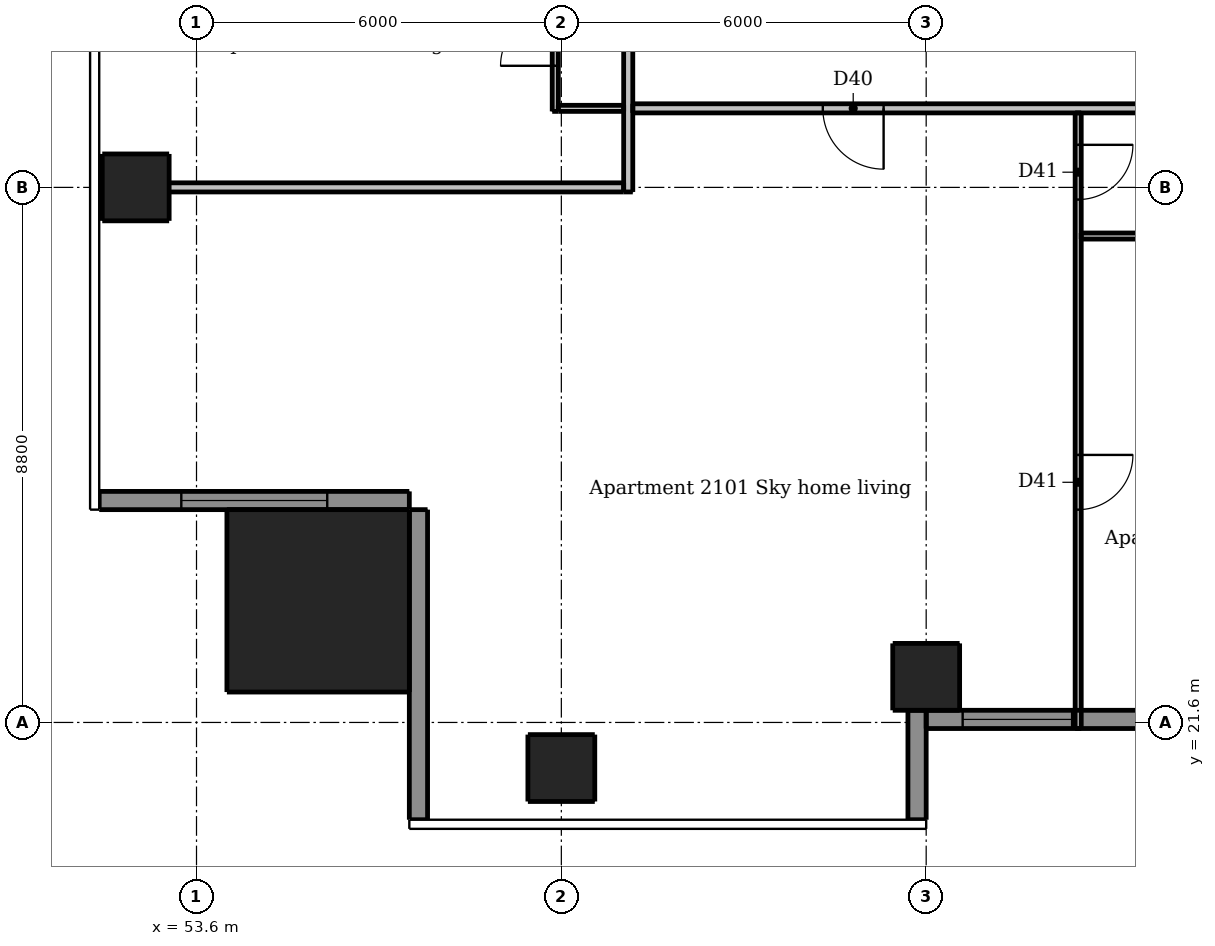
"""IFC4 building model, lengths in metres.
Left out: names, types, materials, properties, quantities, classifications, styles, units other than length and angle.
Written with IfcOpenShell. Run it as: python <this file> out.ifc"""

import sys

from ifc_helpers import new_model, si_unit, direction, frame, frame_2d, origin, origin_2d, place, context, subcontext, project, spatial, rectangle, extrude, element, fill, save


model = new_model("IFC4")
c1 = context("Model", 3, precision=1e-05, world=origin(), true_north=direction((0.0, 1.0)))
c2 = subcontext(c1, "Body", "Model", "MODEL_VIEW")
j1 = project(units=[si_unit("LENGTHUNIT", "METRE"), si_unit("PLANEANGLEUNIT", "RADIAN")], contexts=[c1])
p1 = place(None, origin())
s1 = spatial("IfcSite", under=j1, at=p1, CompositionType="ELEMENT")
p2 = place(p1, origin())
s2 = spatial("IfcBuilding", under=s1, at=p2, CompositionType="ELEMENT")
p3 = place(p2, frame((0.0, 0.0, 82.0)))
s3 = spatial("IfcBuildingStorey", under=s2, at=p3, CompositionType="ELEMENT", Elevation=82.0)
for number, where, z_axis, x_axis in (
    (1, (59.6, 20.85, 0.0), (0.0, 0.0, 1.0), (1.0, 0.0, 0.0)),
    (2, (65.6, 22.35, 0.0), (0.0, 0.0, 1.0), (1.0, 0.0, 0.0)),
    (3, (52.6, 30.4, 0.0), (0.0, 0.0, 1.0), (1.0, 0.0, 0.0)),
):
    element("IfcColumn", number, at=place(p3, frame(where, z_axis=z_axis, x_axis=x_axis)), inside=s3, PredefinedType="COLUMN", context=c2, shape_type="SweptSolid", body=[
        extrude(rectangle(XDim=1.1, YDim=1.1, at=origin_2d()), origin(), (0.0, 0.0, 1.0), 3.05),
    ])
p4 = place(p3, frame((55.6, 23.6, 0.0), z_axis=(0.0, 0.0, 1.0), x_axis=(1.0, 0.0, 0.0)))
e4 = element("IfcColumn", 4, at=p4, inside=s3, PredefinedType="COLUMN", context=c2, shape_type="SweptSolid", body=[
    extrude(rectangle(XDim=3.0, YDim=3.0, at=origin_2d()), origin(), (0.0, 0.0, 1.0), 3.3),
])
p5 = place(p3, frame((65.45, 20.0, 0.0), z_axis=(0.0, 0.0, 1.0), x_axis=(0.0, 1.0, 0.0)))
e5 = element("IfcWall", 5, at=p5, inside=s3, PredefinedType="SOLIDWALL", context=c2, shape_type="SweptSolid", body=[
    extrude(rectangle(XDim=1.8, YDim=0.3, at=frame_2d((0.9, 0.0))), origin(), (0.0, 0.0, 1.0), 3.05),
])
p6 = place(p3, frame((52.0, 25.25, 0.0), z_axis=(0.0, 0.0, 1.0), x_axis=(1.0, 0.0, 0.0)))
e6 = element("IfcWall", 6, at=p6, inside=s3, PredefinedType="SOLIDWALL", context=c2, shape_type="SweptSolid", body=[
    extrude(rectangle(XDim=5.1, YDim=0.3, at=frame_2d((2.55, 0.0))), origin(), (0.0, 0.0, 1.0), 3.05),
])
p7 = place(p6, frame((1.35, 0.0, 0.15)))
e7 = element("IfcOpeningElement", 7, at=p7, cuts=e6, PredefinedType="OPENING", context=c2, shape_type="SweptSolid", body=[
    extrude(rectangle(XDim=2.4, YDim=2.1, at=frame_2d((1.2, 1.05))), frame((0.0, 0.16, 0.0), z_axis=(0.0, -1.0, 0.0), x_axis=(1.0, 0.0, 0.0)), (0.0, 0.0, 1.0), 0.32),
])
p8 = place(p3, frame((57.25, 25.1, 0.0), z_axis=(0.0, 0.0, 1.0), x_axis=(0.0, -1.0, 0.0)))
e8 = element("IfcWall", 8, at=p8, inside=s3, PredefinedType="SOLIDWALL", context=c2, shape_type="SweptSolid", body=[
    extrude(rectangle(XDim=5.1, YDim=0.3, at=frame_2d((2.55, 0.0))), origin(), (0.0, 0.0, 1.0), 3.05),
])
p9 = place(p3, frame((65.6, 21.65, 0.0), z_axis=(0.0, 0.0, 1.0), x_axis=(1.0, 0.0, 0.0)))
e9 = element("IfcWall", 9, at=p9, inside=s3, PredefinedType="SOLIDWALL", context=c2, shape_type="SweptSolid", body=[
    extrude(rectangle(XDim=6.0, YDim=0.3, at=frame_2d((3.0, 0.0))), origin(), (0.0, 0.0, 1.0), 3.05),
])
p10 = place(p9, frame((0.6, 0.0, 0.15)))
e10 = element("IfcOpeningElement", 10, at=p10, cuts=e9, PredefinedType="OPENING", context=c2, shape_type="SweptSolid", body=[
    extrude(rectangle(XDim=1.8, YDim=2.1, at=frame_2d((0.9, 1.05))), frame((0.0, 0.16, 0.0), z_axis=(0.0, -1.0, 0.0), x_axis=(1.0, 0.0, 0.0)), (0.0, 0.0, 1.0), 0.32),
])
p11 = place(p9, frame((3.6, 0.0, 0.15)))
e11 = element("IfcOpeningElement", 11, at=p11, cuts=e9, PredefinedType="OPENING", context=c2, shape_type="SweptSolid", body=[
    extrude(rectangle(XDim=1.8, YDim=2.1, at=frame_2d((0.9, 1.05))), frame((0.0, 0.16, 0.0), z_axis=(0.0, -1.0, 0.0), x_axis=(1.0, 0.0, 0.0)), (0.0, 0.0, 1.0), 0.32),
])
p12 = place(p3, frame((59.5, 31.65, 0.0), z_axis=(0.0, 0.0, 1.0), x_axis=(0.0, 1.0, 0.0)))
e12 = element("IfcWall", 12, at=p12, inside=s3, PredefinedType="PARTITIONING", context=c2, shape_type="SweptSolid", body=[
    extrude(rectangle(XDim=16.675, YDim=0.1, at=frame_2d((8.337, 0.0))), origin(), (0.0, 0.0, 1.0), 2.51),
])
p13 = place(p12, frame((0.75, 0.0, 0.0)))
e13 = element("IfcOpeningElement", 13, at=p13, cuts=e12, PredefinedType="OPENING", context=c2, shape_type="SweptSolid", body=[
    extrude(rectangle(XDim=0.9, YDim=2.1, at=frame_2d((0.45, 1.05))), frame((0.0, 0.06, 0.0), z_axis=(0.0, -1.0, 0.0), x_axis=(1.0, 0.0, 0.0)), (0.0, 0.0, 1.0), 0.12),
])
p14 = place(p12, frame((3.1, 0.0, 0.0)))
e14 = element("IfcOpeningElement", 14, at=p14, cuts=e12, PredefinedType="OPENING", context=c2, shape_type="SweptSolid", body=[
    extrude(rectangle(XDim=0.9, YDim=2.1, at=frame_2d((0.45, 1.05))), frame((0.0, 0.06, 0.0), z_axis=(0.0, -1.0, 0.0), x_axis=(1.0, 0.0, 0.0)), (0.0, 0.0, 1.0), 0.12),
])
p15 = place(p12, frame((8.5, 0.0, 0.0)))
e15 = element("IfcOpeningElement", 15, at=p15, cuts=e12, PredefinedType="OPENING", context=c2, shape_type="SweptSolid", body=[
    extrude(rectangle(XDim=0.9, YDim=2.1, at=frame_2d((0.45, 1.05))), frame((0.0, 0.06, 0.0), z_axis=(0.0, -1.0, 0.0), x_axis=(1.0, 0.0, 0.0)), (0.0, 0.0, 1.0), 0.12),
])
p16 = place(p12, frame((14.5, 0.0, 0.0)))
e16 = element("IfcOpeningElement", 16, at=p16, cuts=e12, PredefinedType="OPENING", context=c2, shape_type="SweptSolid", body=[
    extrude(rectangle(XDim=0.9, YDim=2.1, at=frame_2d((0.45, 1.05))), frame((0.0, 0.06, 0.0), z_axis=(0.0, -1.0, 0.0), x_axis=(1.0, 0.0, 0.0)), (0.0, 0.0, 1.0), 0.12),
])
p17 = place(p12, frame((5.55, 0.0, 0.0)))
e17 = element("IfcOpeningElement", 17, at=p17, cuts=e12, PredefinedType="OPENING", context=c2, shape_type="SweptSolid", body=[
    extrude(rectangle(XDim=0.8, YDim=2.1, at=frame_2d((0.4, 1.05))), frame((0.0, 0.06, 0.0), z_axis=(0.0, -1.0, 0.0), x_axis=(1.0, 0.0, 0.0)), (0.0, 0.0, 1.0), 0.12),
])
p18 = place(p12, frame((11.55, 0.0, 0.0)))
e18 = element("IfcOpeningElement", 18, at=p18, cuts=e12, PredefinedType="OPENING", context=c2, shape_type="SweptSolid", body=[
    extrude(rectangle(XDim=0.8, YDim=2.1, at=frame_2d((0.4, 1.05))), frame((0.0, 0.06, 0.0), z_axis=(0.0, -1.0, 0.0), x_axis=(1.0, 0.0, 0.0)), (0.0, 0.0, 1.0), 0.12),
])
p19 = place(p3, frame((68.1, 31.625, 0.0), z_axis=(0.0, 0.0, 1.0), x_axis=(0.0, -1.0, 0.0)))
e19 = element("IfcWall", 19, at=p19, inside=s3, PredefinedType="PARTITIONING", context=c2, shape_type="SweptSolid", body=[
    extrude(rectangle(XDim=10.125, YDim=0.1, at=frame_2d((5.062, 0.0))), origin(), (0.0, 0.0, 1.0), 3.05),
])
p20 = place(p19, frame((0.525, 0.0, 0.0)))
e20 = element("IfcOpeningElement", 20, at=p20, cuts=e19, PredefinedType="OPENING", context=c2, shape_type="SweptSolid", body=[
    extrude(rectangle(XDim=0.9, YDim=2.1, at=frame_2d((0.45, 1.05))), frame((0.0, 0.06, 0.0), z_axis=(0.0, -1.0, 0.0), x_axis=(1.0, 0.0, 0.0)), (0.0, 0.0, 1.0), 0.12),
])
p21 = place(p19, frame((5.625, 0.0, 0.0)))
e21 = element("IfcOpeningElement", 21, at=p21, cuts=e19, PredefinedType="OPENING", context=c2, shape_type="SweptSolid", body=[
    extrude(rectangle(XDim=0.9, YDim=2.1, at=frame_2d((0.45, 1.05))), frame((0.0, 0.06, 0.0), z_axis=(0.0, -1.0, 0.0), x_axis=(1.0, 0.0, 0.0)), (0.0, 0.0, 1.0), 0.12),
])
p22 = place(p3, frame((59.55, 31.7, 0.0), z_axis=(0.0, 0.0, 1.0), x_axis=(1.0, 0.0, 0.0)))
e22 = element("IfcWall", 22, at=p22, inside=s3, PredefinedType="PARTITIONING", context=c2, shape_type="SweptSolid", body=[
    extrude(rectangle(XDim=1.075, YDim=0.1, at=frame_2d((0.538, 0.0))), origin(), (0.0, 0.0, 1.0), 3.05),
])
p23 = place(p3, frame((68.15, 29.6, 0.0), z_axis=(0.0, 0.0, 1.0), x_axis=(1.0, 0.0, 0.0)))
e23 = element("IfcWall", 23, at=p23, inside=s3, PredefinedType="PARTITIONING", context=c2, shape_type="SweptSolid", body=[
    extrude(rectangle(XDim=6.475, YDim=0.1, at=frame_2d((3.238, 0.0))), origin(), (0.0, 0.0, 1.0), 3.05),
])
p24 = place(p23, frame((4.05, 0.0, 0.0)))
e24 = element("IfcOpeningElement", 24, at=p24, cuts=e23, PredefinedType="OPENING", context=c2, shape_type="SweptSolid", body=[
    extrude(rectangle(XDim=0.8, YDim=2.1, at=frame_2d((0.4, 1.05))), frame((0.0, 0.06, 0.0), z_axis=(0.0, -1.0, 0.0), x_axis=(1.0, 0.0, 0.0)), (0.0, 0.0, 1.0), 0.12),
])
p25 = place(p3, frame((60.7, 30.325, 0.0), z_axis=(0.0, 0.0, 1.0), x_axis=(0.0, 1.0, 0.0)))
e25 = element("IfcWall", 25, at=p25, inside=s3, PredefinedType="PARTITIONING", context=c2, shape_type="SweptSolid", body=[
    extrude(rectangle(XDim=28.9, YDim=0.15, at=frame_2d((14.45, 0.0))), origin(), (0.0, 0.0, 1.0), 3.05),
])
p26 = place(p25, frame((9.225, 0.0, 0.0)))
e26 = element("IfcOpeningElement", 26, at=p26, cuts=e25, PredefinedType="OPENING", context=c2, shape_type="SweptSolid", body=[
    extrude(rectangle(XDim=1.0, YDim=2.1, at=frame_2d((0.5, 1.05))), frame((0.0, 0.085, 0.0), z_axis=(0.0, -1.0, 0.0), x_axis=(1.0, 0.0, 0.0)), (0.0, 0.0, 1.0), 0.17),
])
p27 = place(p25, frame((26.025, 0.0, 0.0)))
e27 = element("IfcOpeningElement", 27, at=p27, cuts=e25, PredefinedType="OPENING", context=c2, shape_type="SweptSolid", body=[
    extrude(rectangle(XDim=1.0, YDim=2.1, at=frame_2d((0.5, 1.05))), frame((0.0, 0.085, 0.0), z_axis=(0.0, -1.0, 0.0), x_axis=(1.0, 0.0, 0.0)), (0.0, 0.0, 1.0), 0.17),
])
p28 = place(p3, frame((89.525, 31.7, 0.0), z_axis=(0.0, 0.0, 1.0), x_axis=(-1.0, 0.0, 0.0)))
e28 = element("IfcWall", 28, at=p28, inside=s3, PredefinedType="PARTITIONING", context=c2, shape_type="SweptSolid", body=[
    extrude(rectangle(XDim=28.75, YDim=0.15, at=frame_2d((14.375, 0.0))), origin(), (0.0, 0.0, 1.0), 3.05),
])
p29 = place(p28, frame((24.625, 0.0, 0.0)))
e29 = element("IfcOpeningElement", 29, at=p29, cuts=e28, PredefinedType="OPENING", context=c2, shape_type="SweptSolid", body=[
    extrude(rectangle(XDim=1.0, YDim=2.1, at=frame_2d((0.5, 1.05))), frame((0.0, 0.085, 0.0), z_axis=(0.0, -1.0, 0.0), x_axis=(1.0, 0.0, 0.0)), (0.0, 0.0, 1.0), 0.17),
])
p30 = place(p28, frame((7.525, 0.0, 0.0)))
e30 = element("IfcOpeningElement", 30, at=p30, cuts=e28, PredefinedType="OPENING", context=c2, shape_type="SweptSolid", body=[
    extrude(rectangle(XDim=1.0, YDim=2.1, at=frame_2d((0.5, 1.05))), frame((0.0, 0.085, 0.0), z_axis=(0.0, -1.0, 0.0), x_axis=(1.0, 0.0, 0.0)), (0.0, 0.0, 1.0), 0.17),
])
p31 = place(p3, frame((52.0, 30.4, 0.0), z_axis=(0.0, 0.0, 1.0), x_axis=(1.0, 0.0, 0.0)))
e31 = element("IfcWall", 31, at=p31, inside=s3, PredefinedType="PARTITIONING", context=c2, shape_type="SweptSolid", body=[
    extrude(rectangle(XDim=8.625, YDim=0.15, at=frame_2d((4.312, 0.0))), origin(), (0.0, 0.0, 1.0), 2.647),
])
p32 = place(p7, origin())
e32 = element("IfcWindow", 32, at=p32, inside=s3, PartitioningType="DOUBLE_PANEL_VERTICAL", PredefinedType="WINDOW", context=c2, shape_type="SweptSolid", body=[
    extrude(rectangle(XDim=2.4, YDim=2.1, at=frame_2d((1.2, 1.05))), frame((0.0, 0.03, 0.0), z_axis=(0.0, -1.0, 0.0), x_axis=(1.0, 0.0, 0.0)), (0.0, 0.0, 1.0), 0.06),
])
fill(e7, e32)
p33 = place(p10, origin())
e33 = element("IfcWindow", 33, at=p33, inside=s3, PartitioningType="DOUBLE_PANEL_VERTICAL", PredefinedType="WINDOW", context=c2, shape_type="SweptSolid", body=[
    extrude(rectangle(XDim=1.8, YDim=2.1, at=frame_2d((0.9, 1.05))), frame((0.0, 0.03, 0.0), z_axis=(0.0, -1.0, 0.0), x_axis=(1.0, 0.0, 0.0)), (0.0, 0.0, 1.0), 0.06),
])
fill(e10, e33)
p34 = place(p29, origin())
e34 = element("IfcDoor", 34, at=p34, inside=s3, OperationType="SINGLE_SWING_LEFT", PredefinedType="DOOR", context=c2, shape_type="SweptSolid", body=[
    extrude(rectangle(XDim=1.0, YDim=2.1, at=frame_2d((0.5, 1.05))), frame((0.0, 0.025, 0.0), z_axis=(0.0, -1.0, 0.0), x_axis=(1.0, 0.0, 0.0)), (0.0, 0.0, 1.0), 0.05),
])
fill(e29, e34)
p35 = place(p20, origin())
e35 = element("IfcDoor", 35, at=p35, inside=s3, OperationType="SINGLE_SWING_LEFT", PredefinedType="DOOR", context=c2, shape_type="SweptSolid", body=[
    extrude(rectangle(XDim=0.9, YDim=2.1, at=frame_2d((0.45, 1.05))), frame((0.0, 0.025, 0.0), z_axis=(0.0, -1.0, 0.0), x_axis=(1.0, 0.0, 0.0)), (0.0, 0.0, 1.0), 0.05),
])
fill(e20, e35)
p36 = place(p21, origin())
e36 = element("IfcDoor", 36, at=p36, inside=s3, OperationType="SINGLE_SWING_LEFT", PredefinedType="DOOR", context=c2, shape_type="SweptSolid", body=[
    extrude(rectangle(XDim=0.9, YDim=2.1, at=frame_2d((0.45, 1.05))), frame((0.0, 0.025, 0.0), z_axis=(0.0, -1.0, 0.0), x_axis=(1.0, 0.0, 0.0)), (0.0, 0.0, 1.0), 0.05),
])
fill(e21, e36)
p37 = place(p13, origin())
e37 = element("IfcDoor", 37, at=p37, inside=s3, OperationType="SINGLE_SWING_LEFT", PredefinedType="DOOR", context=c2, shape_type="SweptSolid", body=[
    extrude(rectangle(XDim=0.9, YDim=2.1, at=frame_2d((0.45, 1.05))), frame((0.0, 0.025, 0.0), z_axis=(0.0, -1.0, 0.0), x_axis=(1.0, 0.0, 0.0)), (0.0, 0.0, 1.0), 0.05),
])
fill(e13, e37)
save(model, sys.argv[1])
